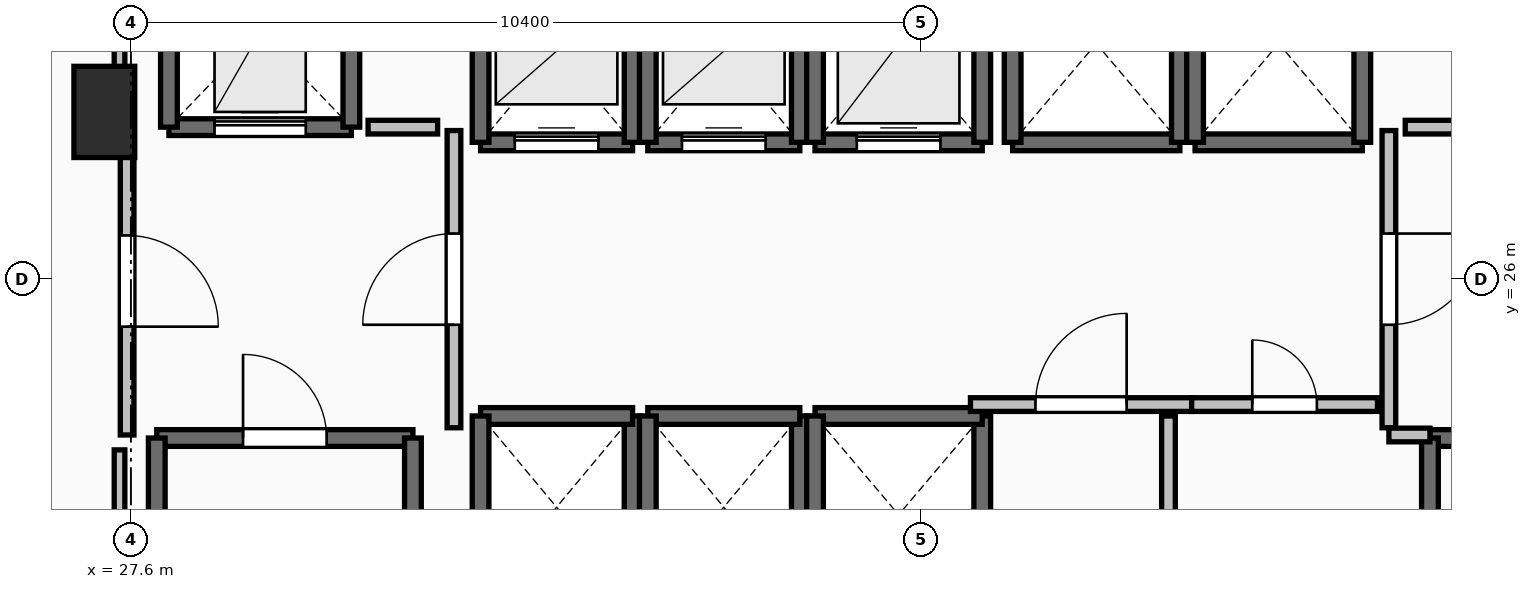
"""IFC4 building model, lengths in metres.
Left out: names, types, materials, properties, quantities, classifications, styles, units other than length and angle.
Written with IfcOpenShell. Run it as: python <this file> out.ifc"""

import sys

from ifc_helpers import new_model, si_unit, direction, frame, frame_2d, origin, origin_2d, place, context, subcontext, project, spatial, rectangle, extrude, element, fill, save


model = new_model("IFC4")
c1 = context("Model", 3, precision=1e-05, world=origin(), true_north=direction((0.0, 1.0)))
c2 = subcontext(c1, "Body", "Model", "MODEL_VIEW")
j1 = project(units=[si_unit("LENGTHUNIT", "METRE"), si_unit("PLANEANGLEUNIT", "RADIAN")], contexts=[c1])
p1 = place(None, origin())
s1 = spatial("IfcSite", under=j1, at=p1, CompositionType="ELEMENT")
p2 = place(p1, origin())
s2 = spatial("IfcBuilding", under=s1, at=p2, CompositionType="ELEMENT")
p3 = place(p2, frame((0.0, 0.0, 66.0)))
s3 = spatial("IfcBuildingStorey", under=s2, at=p3, CompositionType="ELEMENT", Elevation=66.0)
p4 = place(p3, frame((27.25, 28.2, 0.0), z_axis=(0.0, 0.0, 1.0), x_axis=(1.0, 0.0, 0.0)))
e1 = element("IfcColumn", 1, at=p4, inside=s3, PredefinedType="PILASTER", context=c2, shape_type="SweptSolid", body=[
    extrude(rectangle(XDim=0.8, YDim=1.2, at=origin_2d()), origin(), (0.0, 0.0, 1.0), 3.5),
])
p5 = place(p3, frame((27.94, 23.91, 0.0), z_axis=(0.0, 0.0, 1.0), x_axis=(1.0, 0.0, 0.0)))
e2 = element("IfcWall", 2, at=p5, inside=s3, PredefinedType="SOLIDWALL", context=c2, shape_type="SweptSolid", body=[
    extrude(rectangle(XDim=3.37, YDim=0.22, at=frame_2d((1.685, 0.0))), origin(), (0.0, 0.0, 1.0), 3.15),
])
p6 = place(p5, frame((1.135, 0.0, 0.0)))
e3 = element("IfcOpeningElement", 3, at=p6, cuts=e2, PredefinedType="OPENING", context=c2, shape_type="SweptSolid", body=[
    extrude(rectangle(XDim=1.1, YDim=2.15, at=frame_2d((0.55, 1.075))), frame((0.0, 0.125, 0.0), z_axis=(0.0, -1.0, 0.0), x_axis=(1.0, 0.0, 0.0)), (0.0, 0.0, 1.0), 0.25),
])
for number, where, z_axis, x_axis in (
    (4, (31.31, 23.91, 0.0), (0.0, 0.0, 1.0), (0.0, -1.0, 0.0)),
    (5, (27.94, 16.49, 0.0), (0.0, 0.0, 1.0), (0.0, 1.0, 0.0)),
):
    element("IfcWall", number, at=place(p3, frame(where, z_axis=z_axis, x_axis=x_axis)), inside=s3, PredefinedType="SOLIDWALL", context=c2, shape_type="SweptSolid", body=[
        extrude(rectangle(XDim=7.42, YDim=0.22, at=frame_2d((3.71, 0.0))), origin(), (0.0, 0.0, 1.0), 3.15),
    ])
p7 = place(p3, frame((44.69, 23.91, 0.0), z_axis=(0.0, 0.0, 1.0), x_axis=(1.0, 0.0, 0.0)))
e6 = element("IfcWall", 6, at=p7, inside=s3, PredefinedType="SOLIDWALL", context=c2, shape_type="SweptSolid", body=[
    extrude(rectangle(XDim=3.37, YDim=0.22, at=frame_2d((1.685, 0.0))), origin(), (0.0, 0.0, 1.0), 3.15),
])
p8 = place(p7, frame((1.135, 0.0, 0.0)))
e7 = element("IfcOpeningElement", 7, at=p8, cuts=e6, PredefinedType="OPENING", context=c2, shape_type="SweptSolid", body=[
    extrude(rectangle(XDim=1.1, YDim=2.15, at=frame_2d((0.55, 1.075))), frame((0.0, 0.125, 0.0), z_axis=(0.0, -1.0, 0.0), x_axis=(1.0, 0.0, 0.0)), (0.0, 0.0, 1.0), 0.25),
])
p9 = place(p3, frame((44.69, 16.49, 0.0), z_axis=(0.0, 0.0, 1.0), x_axis=(0.0, 1.0, 0.0)))
e8 = element("IfcWall", 8, at=p9, inside=s3, PredefinedType="SOLIDWALL", context=c2, shape_type="SweptSolid", body=[
    extrude(rectangle(XDim=7.42, YDim=0.22, at=frame_2d((3.71, 0.0))), origin(), (0.0, 0.0, 1.0), 3.15),
])
p10 = place(p3, frame((32.2, 27.8, 0.0), z_axis=(0.0, 0.0, 1.0), x_axis=(1.0, 0.0, 0.0)))
e9 = element("IfcWall", 9, at=p10, inside=s3, PredefinedType="SOLIDWALL", context=c2, shape_type="SweptSolid", body=[
    extrude(rectangle(XDim=2.0, YDim=0.22, at=frame_2d((1.0, 0.0))), origin(), (0.0, 0.0, 1.0), 3.15),
])
p11 = place(p10, frame((0.45, 0.0, 0.0)))
e10 = element("IfcOpeningElement", 10, at=p11, cuts=e9, PredefinedType="OPENING", context=c2, shape_type="SweptSolid", body=[
    extrude(rectangle(XDim=1.1, YDim=2.2, at=frame_2d((0.55, 1.1))), frame((0.0, 0.125, 0.0), z_axis=(0.0, -1.0, 0.0), x_axis=(1.0, 0.0, 0.0)), (0.0, 0.0, 1.0), 0.25),
])
for number, where, z_axis, x_axis in (
    (11, (34.2, 27.8, 0.0), (0.0, 0.0, 1.0), (0.0, 1.0, 0.0)),
    (12, (32.2, 30.2, 0.0), (0.0, 0.0, 1.0), (0.0, -1.0, 0.0)),
):
    element("IfcWall", number, at=place(p3, frame(where, z_axis=z_axis, x_axis=x_axis)), inside=s3, PredefinedType="SOLIDWALL", context=c2, shape_type="SweptSolid", body=[
        extrude(rectangle(XDim=2.4, YDim=0.22, at=frame_2d((1.2, 0.0))), origin(), (0.0, 0.0, 1.0), 3.15),
    ])
p12 = place(p3, frame((34.4, 27.8, 0.0), z_axis=(0.0, 0.0, 1.0), x_axis=(1.0, 0.0, 0.0)))
e13 = element("IfcWall", 13, at=p12, inside=s3, PredefinedType="SOLIDWALL", context=c2, shape_type="SweptSolid", body=[
    extrude(rectangle(XDim=2.0, YDim=0.22, at=frame_2d((1.0, 0.0))), origin(), (0.0, 0.0, 1.0), 3.15),
])
p13 = place(p12, frame((0.45, 0.0, 0.0)))
e14 = element("IfcOpeningElement", 14, at=p13, cuts=e13, PredefinedType="OPENING", context=c2, shape_type="SweptSolid", body=[
    extrude(rectangle(XDim=1.1, YDim=2.2, at=frame_2d((0.55, 1.1))), frame((0.0, 0.125, 0.0), z_axis=(0.0, -1.0, 0.0), x_axis=(1.0, 0.0, 0.0)), (0.0, 0.0, 1.0), 0.25),
])
for number, where, z_axis, x_axis in (
    (15, (36.4, 27.8, 0.0), (0.0, 0.0, 1.0), (0.0, 1.0, 0.0)),
    (16, (34.4, 30.2, 0.0), (0.0, 0.0, 1.0), (0.0, -1.0, 0.0)),
):
    element("IfcWall", number, at=place(p3, frame(where, z_axis=z_axis, x_axis=x_axis)), inside=s3, PredefinedType="SOLIDWALL", context=c2, shape_type="SweptSolid", body=[
        extrude(rectangle(XDim=2.4, YDim=0.22, at=frame_2d((1.2, 0.0))), origin(), (0.0, 0.0, 1.0), 3.15),
    ])
p14 = place(p3, frame((36.6, 27.8, 0.0), z_axis=(0.0, 0.0, 1.0), x_axis=(1.0, 0.0, 0.0)))
e17 = element("IfcWall", 17, at=p14, inside=s3, PredefinedType="SOLIDWALL", context=c2, shape_type="SweptSolid", body=[
    extrude(rectangle(XDim=2.2, YDim=0.22, at=frame_2d((1.1, 0.0))), origin(), (0.0, 0.0, 1.0), 3.15),
])
p15 = place(p14, frame((0.55, 0.0, 0.0)))
e18 = element("IfcOpeningElement", 18, at=p15, cuts=e17, PredefinedType="OPENING", context=c2, shape_type="SweptSolid", body=[
    extrude(rectangle(XDim=1.1, YDim=2.2, at=frame_2d((0.55, 1.1))), frame((0.0, 0.125, 0.0), z_axis=(0.0, -1.0, 0.0), x_axis=(1.0, 0.0, 0.0)), (0.0, 0.0, 1.0), 0.25),
])
for number, where, z_axis, x_axis in (
    (19, (38.8, 27.8, 0.0), (0.0, 0.0, 1.0), (0.0, 1.0, 0.0)),
    (20, (36.6, 30.4, 0.0), (0.0, 0.0, 1.0), (0.0, -1.0, 0.0)),
):
    element("IfcWall", number, at=place(p3, frame(where, z_axis=z_axis, x_axis=x_axis)), inside=s3, PredefinedType="SOLIDWALL", context=c2, shape_type="SweptSolid", body=[
        extrude(rectangle(XDim=2.6, YDim=0.22, at=frame_2d((1.3, 0.0))), origin(), (0.0, 0.0, 1.0), 3.15),
    ])
p16 = place(p3, frame((34.2, 21.8, 0.0), z_axis=(0.0, 0.0, 1.0), x_axis=(0.0, 1.0, 0.0)))
e21 = element("IfcWall", 21, at=p16, inside=s3, PredefinedType="SOLIDWALL", context=c2, shape_type="SweptSolid", body=[
    extrude(rectangle(XDim=2.4, YDim=0.22, at=frame_2d((1.2, 0.0))), origin(), (0.0, 0.0, 1.0), 3.15),
])
p17 = place(p3, frame((34.2, 24.2, 0.0), z_axis=(0.0, 0.0, 1.0), x_axis=(-1.0, 0.0, 0.0)))
e22 = element("IfcWall", 22, at=p17, inside=s3, PredefinedType="SOLIDWALL", context=c2, shape_type="SweptSolid", body=[
    extrude(rectangle(XDim=2.0, YDim=0.22, at=frame_2d((1.0, 0.0))), origin(), (0.0, 0.0, 1.0), 3.15),
])
for number, where, z_axis, x_axis in (
    (23, (32.2, 24.2, 0.0), (0.0, 0.0, 1.0), (0.0, -1.0, 0.0)),
    (24, (36.4, 21.8, 0.0), (0.0, 0.0, 1.0), (0.0, 1.0, 0.0)),
):
    element("IfcWall", number, at=place(p3, frame(where, z_axis=z_axis, x_axis=x_axis)), inside=s3, PredefinedType="SOLIDWALL", context=c2, shape_type="SweptSolid", body=[
        extrude(rectangle(XDim=2.4, YDim=0.22, at=frame_2d((1.2, 0.0))), origin(), (0.0, 0.0, 1.0), 3.15),
    ])
p18 = place(p3, frame((36.4, 24.2, 0.0), z_axis=(0.0, 0.0, 1.0), x_axis=(-1.0, 0.0, 0.0)))
e25 = element("IfcWall", 25, at=p18, inside=s3, PredefinedType="SOLIDWALL", context=c2, shape_type="SweptSolid", body=[
    extrude(rectangle(XDim=2.0, YDim=0.22, at=frame_2d((1.0, 0.0))), origin(), (0.0, 0.0, 1.0), 3.15),
])
p19 = place(p3, frame((34.4, 24.2, 0.0), z_axis=(0.0, 0.0, 1.0), x_axis=(0.0, -1.0, 0.0)))
e26 = element("IfcWall", 26, at=p19, inside=s3, PredefinedType="SOLIDWALL", context=c2, shape_type="SweptSolid", body=[
    extrude(rectangle(XDim=2.4, YDim=0.22, at=frame_2d((1.2, 0.0))), origin(), (0.0, 0.0, 1.0), 3.15),
])
p20 = place(p3, frame((38.8, 21.6, 0.0), z_axis=(0.0, 0.0, 1.0), x_axis=(0.0, 1.0, 0.0)))
e27 = element("IfcWall", 27, at=p20, inside=s3, PredefinedType="SOLIDWALL", context=c2, shape_type="SweptSolid", body=[
    extrude(rectangle(XDim=2.6, YDim=0.22, at=frame_2d((1.3, 0.0))), origin(), (0.0, 0.0, 1.0), 3.15),
])
p21 = place(p3, frame((38.8, 24.2, 0.0), z_axis=(0.0, 0.0, 1.0), x_axis=(-1.0, 0.0, 0.0)))
e28 = element("IfcWall", 28, at=p21, inside=s3, PredefinedType="SOLIDWALL", context=c2, shape_type="SweptSolid", body=[
    extrude(rectangle(XDim=2.2, YDim=0.22, at=frame_2d((1.1, 0.0))), origin(), (0.0, 0.0, 1.0), 3.15),
])
p22 = place(p3, frame((36.6, 24.2, 0.0), z_axis=(0.0, 0.0, 1.0), x_axis=(0.0, -1.0, 0.0)))
e29 = element("IfcWall", 29, at=p22, inside=s3, PredefinedType="SOLIDWALL", context=c2, shape_type="SweptSolid", body=[
    extrude(rectangle(XDim=2.6, YDim=0.22, at=frame_2d((1.3, 0.0))), origin(), (0.0, 0.0, 1.0), 3.15),
])
p23 = place(p3, frame((39.2, 27.8, 0.0), z_axis=(0.0, 0.0, 1.0), x_axis=(1.0, 0.0, 0.0)))
e30 = element("IfcWall", 30, at=p23, inside=s3, PredefinedType="SOLIDWALL", context=c2, shape_type="SweptSolid", body=[
    extrude(rectangle(XDim=2.2, YDim=0.22, at=frame_2d((1.1, 0.0))), origin(), (0.0, 0.0, 1.0), 3.15),
])
for number, where, z_axis, x_axis in (
    (31, (41.4, 27.8, 0.0), (0.0, 0.0, 1.0), (0.0, 1.0, 0.0)),
    (32, (39.2, 30.4, 0.0), (0.0, 0.0, 1.0), (0.0, -1.0, 0.0)),
):
    element("IfcWall", number, at=place(p3, frame(where, z_axis=z_axis, x_axis=x_axis)), inside=s3, PredefinedType="SOLIDWALL", context=c2, shape_type="SweptSolid", body=[
        extrude(rectangle(XDim=2.6, YDim=0.22, at=frame_2d((1.3, 0.0))), origin(), (0.0, 0.0, 1.0), 3.15),
    ])
p24 = place(p3, frame((41.6, 27.8, 0.0), z_axis=(0.0, 0.0, 1.0), x_axis=(1.0, 0.0, 0.0)))
e33 = element("IfcWall", 33, at=p24, inside=s3, PredefinedType="SOLIDWALL", context=c2, shape_type="SweptSolid", body=[
    extrude(rectangle(XDim=2.2, YDim=0.22, at=frame_2d((1.1, 0.0))), origin(), (0.0, 0.0, 1.0), 3.15),
])
for number, where, z_axis, x_axis in (
    (34, (43.8, 27.8, 0.0), (0.0, 0.0, 1.0), (0.0, 1.0, 0.0)),
    (35, (41.6, 30.4, 0.0), (0.0, 0.0, 1.0), (0.0, -1.0, 0.0)),
):
    element("IfcWall", number, at=place(p3, frame(where, z_axis=z_axis, x_axis=x_axis)), inside=s3, PredefinedType="SOLIDWALL", context=c2, shape_type="SweptSolid", body=[
        extrude(rectangle(XDim=2.6, YDim=0.22, at=frame_2d((1.3, 0.0))), origin(), (0.0, 0.0, 1.0), 3.15),
    ])
p25 = place(p3, frame((28.1, 28.0, 0.0), z_axis=(0.0, 0.0, 1.0), x_axis=(1.0, 0.0, 0.0)))
e36 = element("IfcWall", 36, at=p25, inside=s3, PredefinedType="SHEAR", context=c2, shape_type="SweptSolid", body=[
    extrude(rectangle(XDim=2.4, YDim=0.22, at=frame_2d((1.2, 0.0))), origin(), (0.0, 0.0, 1.0), 3.15),
])
p26 = place(p25, frame((0.6, 0.0, 0.0)))
e37 = element("IfcOpeningElement", 37, at=p26, cuts=e36, PredefinedType="OPENING", context=c2, shape_type="SweptSolid", body=[
    extrude(rectangle(XDim=1.2, YDim=2.2, at=frame_2d((0.6, 1.1))), frame((0.0, 0.125, 0.0), z_axis=(0.0, -1.0, 0.0), x_axis=(1.0, 0.0, 0.0)), (0.0, 0.0, 1.0), 0.25),
])
for number, where, z_axis, x_axis in (
    (38, (30.5, 28.0, 0.0), (0.0, 0.0, 1.0), (0.0, 1.0, 0.0)),
    (39, (28.1, 30.5, 0.0), (0.0, 0.0, 1.0), (0.0, -1.0, 0.0)),
):
    element("IfcWall", number, at=place(p3, frame(where, z_axis=z_axis, x_axis=x_axis)), inside=s3, PredefinedType="SHEAR", context=c2, shape_type="SweptSolid", body=[
        extrude(rectangle(XDim=2.5, YDim=0.22, at=frame_2d((1.25, 0.0))), origin(), (0.0, 0.0, 1.0), 3.15),
    ])
p27 = place(p3, frame((31.85, 24.045, 0.0), z_axis=(0.0, 0.0, 1.0), x_axis=(0.0, 1.0, 0.0)))
e40 = element("IfcWall", 40, at=p27, inside=s3, PredefinedType="PARTITIONING", context=c2, shape_type="SweptSolid", body=[
    extrude(rectangle(XDim=3.91, YDim=0.18, at=frame_2d((1.955, 0.0))), origin(), (0.0, 0.0, 1.0), 3.15),
])
p28 = place(p27, frame((1.355, 0.0, 0.0)))
e41 = element("IfcOpeningElement", 41, at=p28, cuts=e40, PredefinedType="OPENING", context=c2, shape_type="SweptSolid", body=[
    extrude(rectangle(XDim=1.2, YDim=2.15, at=frame_2d((0.6, 1.075))), frame((0.0, 0.105, 0.0), z_axis=(0.0, -1.0, 0.0), x_axis=(1.0, 0.0, 0.0)), (0.0, 0.0, 1.0), 0.21),
])
p29 = place(p3, frame((27.55, 28.0, 0.0), z_axis=(0.0, 0.0, 1.0), x_axis=(0.0, -1.0, 0.0)))
e42 = element("IfcWall", 42, at=p29, inside=s3, PredefinedType="PARTITIONING", context=c2, shape_type="SweptSolid", body=[
    extrude(rectangle(XDim=4.05, YDim=0.18, at=frame_2d((2.025, 0.0))), origin(), (0.0, 0.0, 1.0), 3.15),
])
p30 = place(p29, frame((1.425, 0.0, 0.0)))
e43 = element("IfcOpeningElement", 43, at=p30, cuts=e42, PredefinedType="OPENING", context=c2, shape_type="SweptSolid", body=[
    extrude(rectangle(XDim=1.2, YDim=2.15, at=frame_2d((0.6, 1.075))), frame((0.0, 0.105, 0.0), z_axis=(0.0, -1.0, 0.0), x_axis=(1.0, 0.0, 0.0)), (0.0, 0.0, 1.0), 0.21),
])
p31 = place(p3, frame((44.15, 27.955, 0.0), z_axis=(0.0, 0.0, 1.0), x_axis=(0.0, -1.0, 0.0)))
e44 = element("IfcWall", 44, at=p31, inside=s3, PredefinedType="PARTITIONING", context=c2, shape_type="SweptSolid", body=[
    extrude(rectangle(XDim=3.91, YDim=0.18, at=frame_2d((1.955, 0.0))), origin(), (0.0, 0.0, 1.0), 3.15),
])
p32 = place(p31, frame((1.355, 0.0, 0.0)))
e45 = element("IfcOpeningElement", 45, at=p32, cuts=e44, PredefinedType="OPENING", context=c2, shape_type="SweptSolid", body=[
    extrude(rectangle(XDim=1.2, YDim=2.15, at=frame_2d((0.6, 1.075))), frame((0.0, 0.105, 0.0), z_axis=(0.0, -1.0, 0.0), x_axis=(1.0, 0.0, 0.0)), (0.0, 0.0, 1.0), 0.21),
])
p33 = place(p3, frame((44.15, 23.95, 0.0), z_axis=(0.0, 0.0, 1.0), x_axis=(1.0, 0.0, 0.0)))
e46 = element("IfcWall", 46, at=p33, inside=s3, PredefinedType="PARTITIONING", context=c2, shape_type="SweptSolid", body=[
    extrude(rectangle(XDim=0.54, YDim=0.18, at=frame_2d((0.27, 0.0))), origin(), (0.0, 0.0, 1.0), 3.15),
])
p34 = place(p3, frame((38.645, 24.35, 0.0), z_axis=(0.0, 0.0, 1.0), x_axis=(1.0, 0.0, 0.0)))
e47 = element("IfcWall", 47, at=p34, inside=s3, PredefinedType="PARTITIONING", context=c2, shape_type="SweptSolid", body=[
    extrude(rectangle(XDim=2.91, YDim=0.18, at=frame_2d((1.455, 0.0))), origin(), (0.0, 0.0, 1.0), 3.15),
])
p35 = place(p34, frame((0.855, 0.0, 0.0)))
e48 = element("IfcOpeningElement", 48, at=p35, cuts=e47, PredefinedType="OPENING", context=c2, shape_type="SweptSolid", body=[
    extrude(rectangle(XDim=1.2, YDim=2.15, at=frame_2d((0.6, 1.075))), frame((0.0, 0.105, 0.0), z_axis=(0.0, -1.0, 0.0), x_axis=(1.0, 0.0, 0.0)), (0.0, 0.0, 1.0), 0.21),
])
p36 = place(p3, frame((41.555, 24.35, 0.0), z_axis=(0.0, 0.0, 1.0), x_axis=(1.0, 0.0, 0.0)))
e49 = element("IfcWall", 49, at=p36, inside=s3, PredefinedType="PARTITIONING", context=c2, shape_type="SweptSolid", body=[
    extrude(rectangle(XDim=2.445, YDim=0.18, at=frame_2d((1.223, 0.0))), origin(), (0.0, 0.0, 1.0), 3.15),
])
p37 = place(p36, frame((0.798, 0.0, 0.0)))
e50 = element("IfcOpeningElement", 50, at=p37, cuts=e49, PredefinedType="OPENING", context=c2, shape_type="SweptSolid", body=[
    extrude(rectangle(XDim=0.85, YDim=2.1, at=frame_2d((0.425, 1.05))), frame((0.0, 0.105, 0.0), z_axis=(0.0, -1.0, 0.0), x_axis=(1.0, 0.0, 0.0)), (0.0, 0.0, 1.0), 0.21),
])
p38 = place(p3, frame((41.25, 20.305, 0.0), z_axis=(0.0, 0.0, 1.0), x_axis=(0.0, 1.0, 0.0)))
e51 = element("IfcWall", 51, at=p38, inside=s3, PredefinedType="PARTITIONING", context=c2, shape_type="SweptSolid", body=[
    extrude(rectangle(XDim=3.895, YDim=0.18, at=frame_2d((1.948, 0.0))), origin(), (0.0, 0.0, 1.0), 3.15),
])
p39 = place(p38, frame((1.522, 0.0, 0.0)))
e52 = element("IfcOpeningElement", 52, at=p39, cuts=e51, PredefinedType="OPENING", context=c2, shape_type="SweptSolid", body=[
    extrude(rectangle(XDim=0.85, YDim=2.1, at=frame_2d((0.425, 1.05))), frame((0.0, 0.105, 0.0), z_axis=(0.0, -1.0, 0.0), x_axis=(1.0, 0.0, 0.0)), (0.0, 0.0, 1.0), 0.21),
])
for number, where, z_axis, x_axis in (
    (53, (31.635, 28.0, 0.0), (0.0, 0.0, 1.0), (-1.0, 0.0, 0.0)),
    (54, (45.28, 28.0, 0.0), (0.0, 0.0, 1.0), (-1.0, 0.0, 0.0)),
):
    element("IfcWall", number, at=place(p3, frame(where, z_axis=z_axis, x_axis=x_axis)), inside=s3, PredefinedType="PARTITIONING", context=c2, shape_type="SweptSolid", body=[
        extrude(rectangle(XDim=0.915, YDim=0.18, at=frame_2d((0.458, 0.0))), origin(), (0.0, 0.0, 1.0), 3.15),
    ])
p40 = place(p3, frame((27.45, 16.24, 0.0), z_axis=(0.0, 0.0, 1.0), x_axis=(0.0, 1.0, 0.0)))
e55 = element("IfcWall", 55, at=p40, inside=s3, PredefinedType="PARTITIONING", context=c2, shape_type="SweptSolid", body=[
    extrude(rectangle(XDim=7.514, YDim=0.14, at=frame_2d((3.757, 0.0))), origin(), (0.0, 0.0, 1.0), 2.342),
])
p41 = place(p3, frame((27.45, 28.196, 0.0), z_axis=(0.0, 0.0, 1.0), x_axis=(0.0, 1.0, 0.0)))
e56 = element("IfcWall", 56, at=p41, inside=s3, PredefinedType="PARTITIONING", context=c2, shape_type="SweptSolid", body=[
    extrude(rectangle(XDim=5.254, YDim=0.14, at=frame_2d((2.627, 0.0))), origin(), (0.0, 0.0, 1.0), 2.342),
])
p42 = place(p6, origin())
e57 = element("IfcDoor", 57, at=p42, inside=s3, OperationType="SINGLE_SWING_LEFT", PredefinedType="DOOR", context=c2, shape_type="SweptSolid", body=[
    extrude(rectangle(XDim=1.1, YDim=2.15, at=frame_2d((0.55, 1.075))), frame((0.0, 0.025, 0.0), z_axis=(0.0, -1.0, 0.0), x_axis=(1.0, 0.0, 0.0)), (0.0, 0.0, 1.0), 0.05),
])
fill(e3, e57)
p43 = place(p11, origin())
e58 = element("IfcDoor", 58, at=p43, inside=s3, OperationType="SLIDING_TO_LEFT", PredefinedType="DOOR", context=c2, shape_type="SweptSolid", body=[
    extrude(rectangle(XDim=1.1, YDim=2.2, at=frame_2d((0.55, 1.1))), frame((0.0, 0.025, 0.0), z_axis=(0.0, -1.0, 0.0), x_axis=(1.0, 0.0, 0.0)), (0.0, 0.0, 1.0), 0.05),
])
fill(e10, e58)
p44 = place(p13, origin())
e59 = element("IfcDoor", 59, at=p44, inside=s3, OperationType="SLIDING_TO_LEFT", PredefinedType="DOOR", context=c2, shape_type="SweptSolid", body=[
    extrude(rectangle(XDim=1.1, YDim=2.2, at=frame_2d((0.55, 1.1))), frame((0.0, 0.025, 0.0), z_axis=(0.0, -1.0, 0.0), x_axis=(1.0, 0.0, 0.0)), (0.0, 0.0, 1.0), 0.05),
])
fill(e14, e59)
p45 = place(p15, origin())
e60 = element("IfcDoor", 60, at=p45, inside=s3, OperationType="SLIDING_TO_LEFT", PredefinedType="DOOR", context=c2, shape_type="SweptSolid", body=[
    extrude(rectangle(XDim=1.1, YDim=2.2, at=frame_2d((0.55, 1.1))), frame((0.0, 0.025, 0.0), z_axis=(0.0, -1.0, 0.0), x_axis=(1.0, 0.0, 0.0)), (0.0, 0.0, 1.0), 0.05),
])
fill(e18, e60)
p46 = place(p26, origin())
e61 = element("IfcDoor", 61, at=p46, inside=s3, OperationType="SLIDING_TO_LEFT", PredefinedType="DOOR", context=c2, shape_type="SweptSolid", body=[
    extrude(rectangle(XDim=1.2, YDim=2.2, at=frame_2d((0.6, 1.1))), frame((0.0, 0.025, 0.0), z_axis=(0.0, -1.0, 0.0), x_axis=(1.0, 0.0, 0.0)), (0.0, 0.0, 1.0), 0.05),
])
fill(e37, e61)
p47 = place(p28, origin())
e62 = element("IfcDoor", 62, at=p47, inside=s3, OperationType="SINGLE_SWING_LEFT", PredefinedType="DOOR", context=c2, shape_type="SweptSolid", body=[
    extrude(rectangle(XDim=1.2, YDim=2.15, at=frame_2d((0.6, 1.075))), frame((0.0, 0.025, 0.0), z_axis=(0.0, -1.0, 0.0), x_axis=(1.0, 0.0, 0.0)), (0.0, 0.0, 1.0), 0.05),
])
fill(e41, e62)
p48 = place(p30, origin())
e63 = element("IfcDoor", 63, at=p48, inside=s3, OperationType="SINGLE_SWING_RIGHT", PredefinedType="DOOR", context=c2, shape_type="SweptSolid", body=[
    extrude(rectangle(XDim=1.2, YDim=2.15, at=frame_2d((0.6, 1.075))), frame((0.0, 0.025, 0.0), z_axis=(0.0, -1.0, 0.0), x_axis=(1.0, 0.0, 0.0)), (0.0, 0.0, 1.0), 0.05),
])
fill(e43, e63)
p49 = place(p32, origin())
e64 = element("IfcDoor", 64, at=p49, inside=s3, OperationType="SINGLE_SWING_LEFT", PredefinedType="DOOR", context=c2, shape_type="SweptSolid", body=[
    extrude(rectangle(XDim=1.2, YDim=2.15, at=frame_2d((0.6, 1.075))), frame((0.0, 0.025, 0.0), z_axis=(0.0, -1.0, 0.0), x_axis=(1.0, 0.0, 0.0)), (0.0, 0.0, 1.0), 0.05),
])
fill(e45, e64)
p50 = place(p35, origin())
e65 = element("IfcDoor", 65, at=p50, inside=s3, OperationType="SINGLE_SWING_RIGHT", PredefinedType="DOOR", context=c2, shape_type="SweptSolid", body=[
    extrude(rectangle(XDim=1.2, YDim=2.15, at=frame_2d((0.6, 1.075))), frame((0.0, 0.025, 0.0), z_axis=(0.0, -1.0, 0.0), x_axis=(1.0, 0.0, 0.0)), (0.0, 0.0, 1.0), 0.05),
])
fill(e48, e65)
p51 = place(p37, origin())
e66 = element("IfcDoor", 66, at=p51, inside=s3, OperationType="SINGLE_SWING_LEFT", PredefinedType="DOOR", context=c2, shape_type="SweptSolid", body=[
    extrude(rectangle(XDim=0.85, YDim=2.1, at=frame_2d((0.425, 1.05))), frame((0.0, 0.025, 0.0), z_axis=(0.0, -1.0, 0.0), x_axis=(1.0, 0.0, 0.0)), (0.0, 0.0, 1.0), 0.05),
])
fill(e50, e66)
save(model, sys.argv[1])
